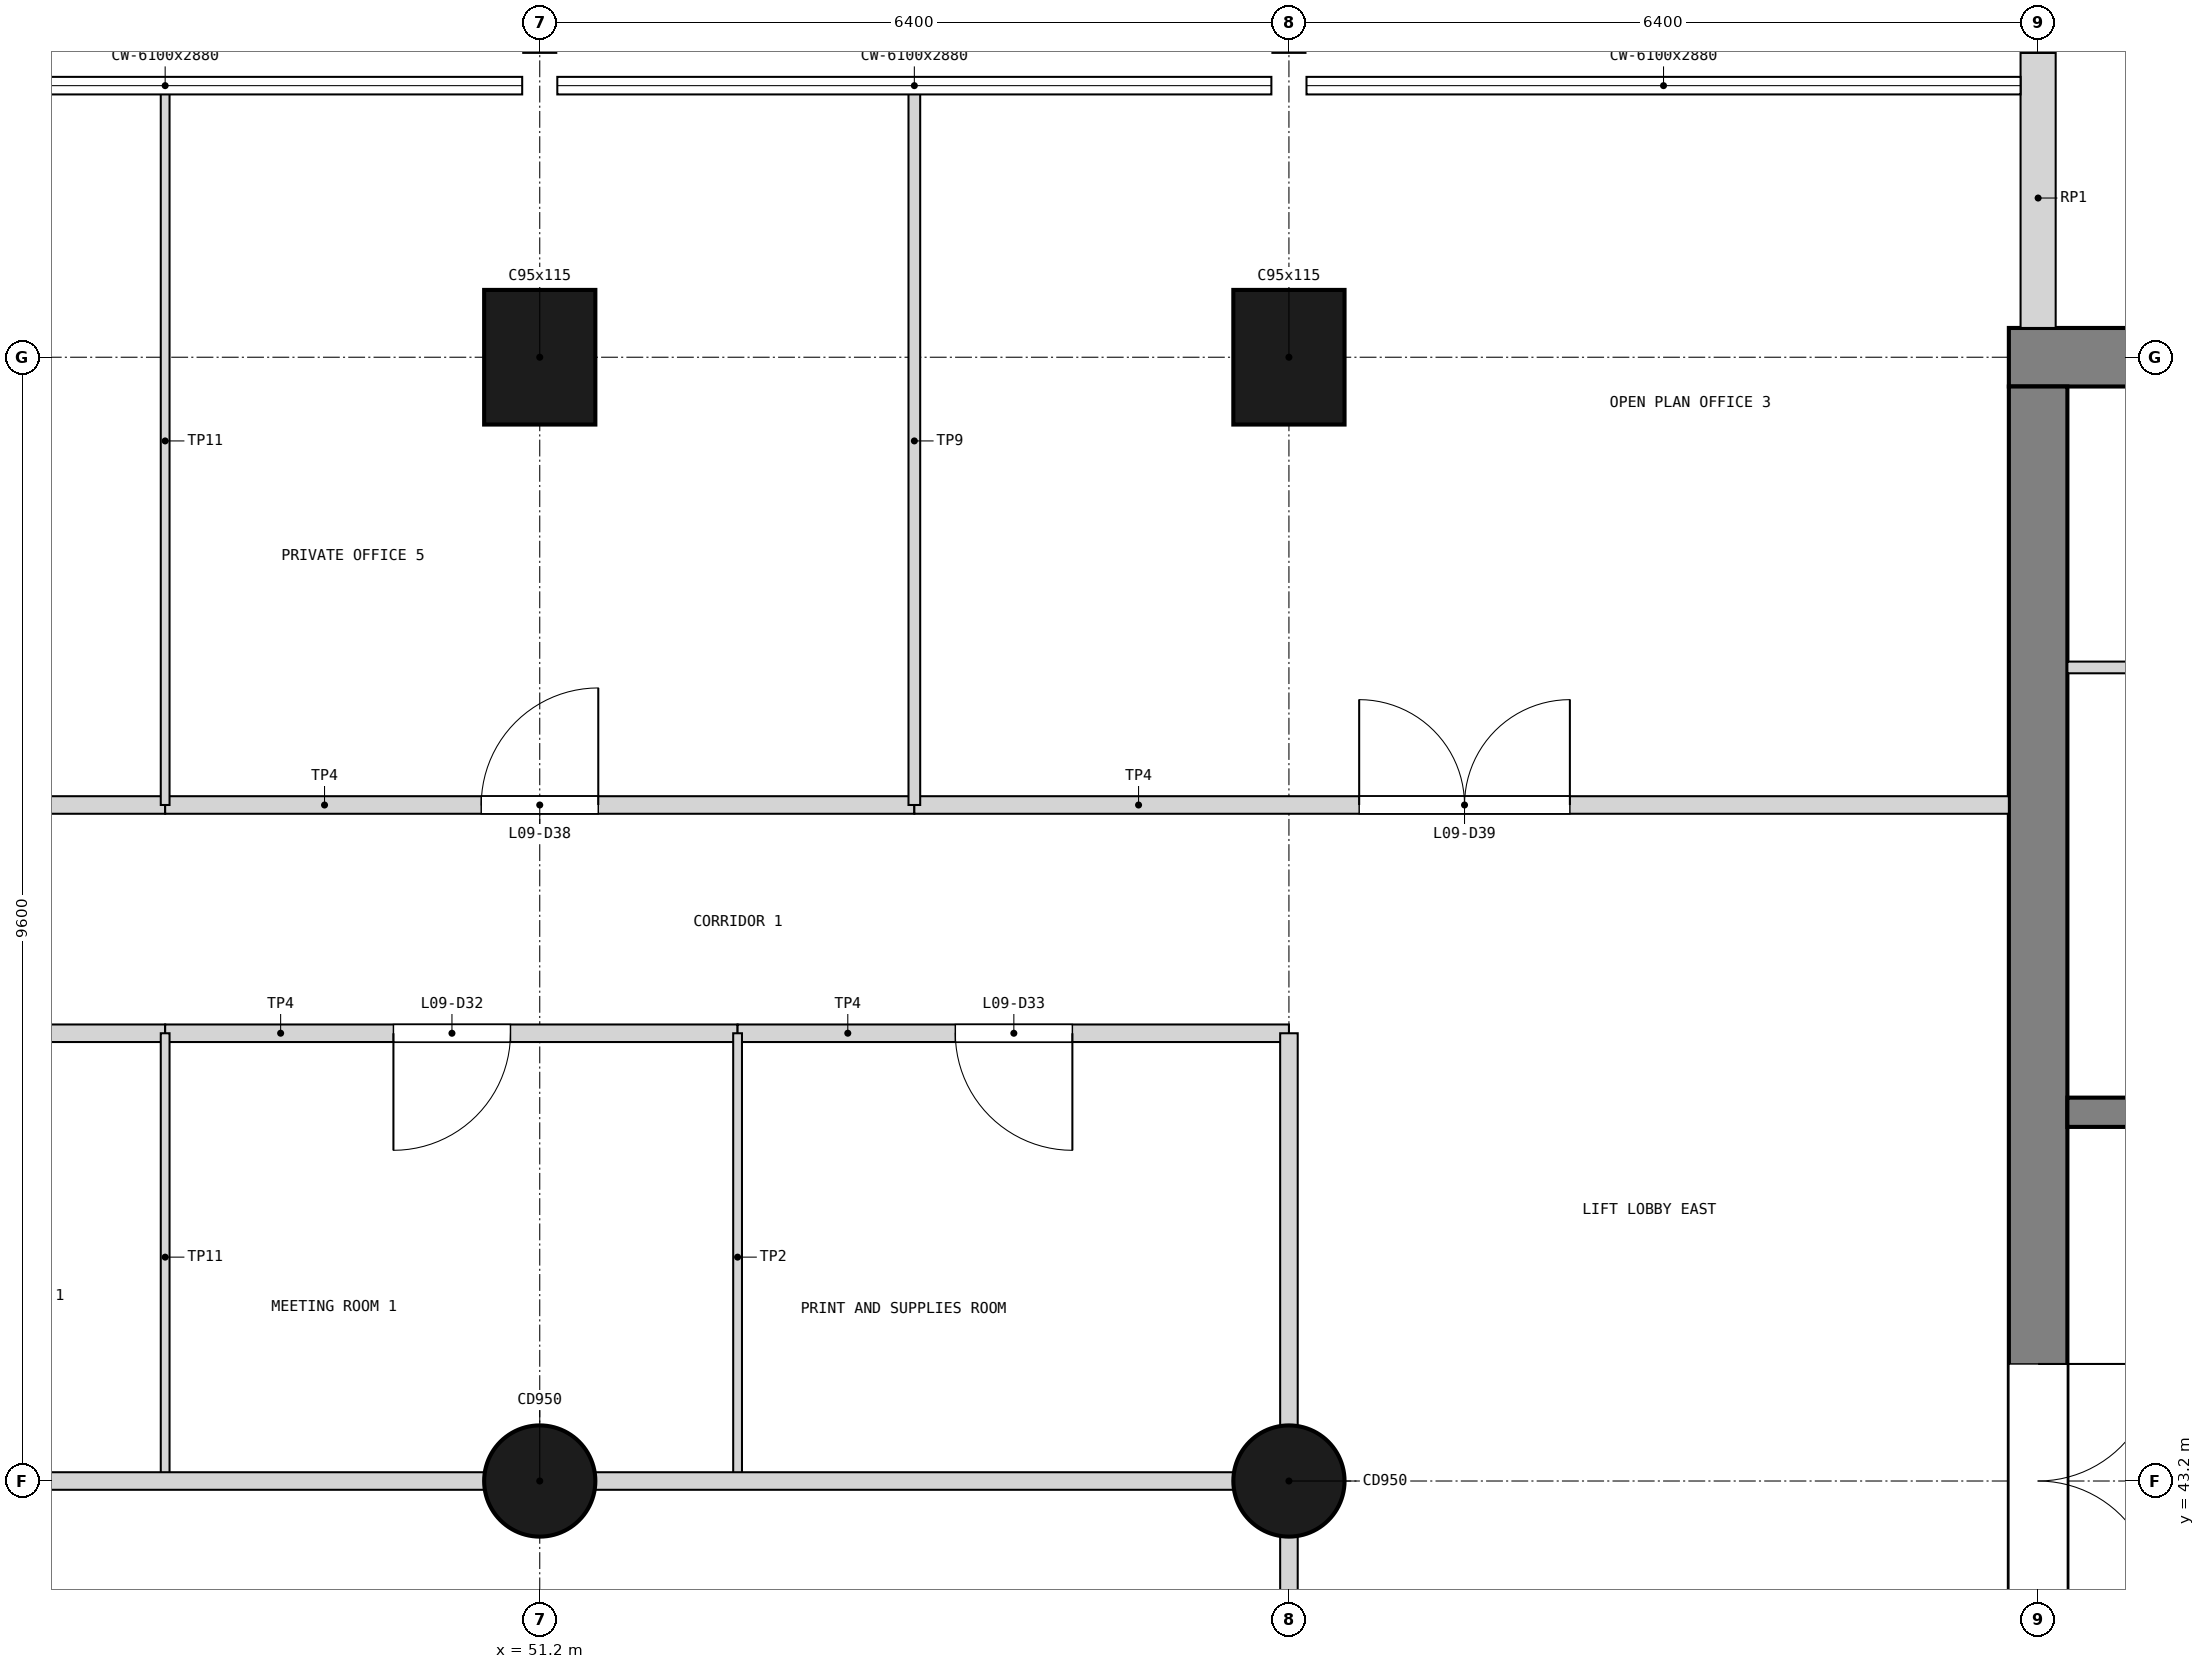
"""IFC4 building model, lengths in metres.
Left out: names, types, materials, properties, quantities, classifications, styles, units other than length and angle.
Written with IfcOpenShell. Run it as: python <this file> out.ifc"""

import sys

from ifc_helpers import new_model, si_unit, direction, frame, frame_2d, origin, origin_2d, place, context, subcontext, project, spatial, rectangle, circle, extrude, element, fill, save


model = new_model("IFC4")
c1 = context("Model", 3, precision=1e-05, world=origin(), true_north=direction((0.0, 1.0)))
c2 = subcontext(c1, "Body", "Model", "MODEL_VIEW")
j1 = project(units=[si_unit("LENGTHUNIT", "METRE"), si_unit("PLANEANGLEUNIT", "RADIAN")], contexts=[c1])
p1 = place(None, origin())
s1 = spatial("IfcSite", under=j1, at=p1, CompositionType="ELEMENT")
p2 = place(p1, origin())
s2 = spatial("IfcBuilding", under=s1, at=p2, CompositionType="ELEMENT")
p3 = place(p2, frame((0.0, 0.0, 36.6)))
s3 = spatial("IfcBuildingStorey", under=s2, at=p3, CompositionType="ELEMENT", Elevation=36.6)
p4 = place(p3, frame((63.75, 52.8, 0.0), z_axis=(0.0, 0.0, 1.0), x_axis=(1.0, 0.0, 0.0)))
e1 = element("IfcWall", 1, at=p4, inside=s3, PredefinedType="SHEAR", context=c2, shape_type="SweptSolid", body=[
    extrude(rectangle(XDim=13.3, YDim=0.5, at=frame_2d((6.65, 0.0))), origin(), (0.0, 0.0, 1.0), 3.9),
])
p5 = place(p4, frame((11.05, 0.0, 1.0)))
e2 = element("IfcOpeningElement", 2, at=p5, cuts=e1, PredefinedType="OPENING", context=c2, shape_type="SweptSolid", body=[
    extrude(rectangle(XDim=0.4, YDim=2.0, at=frame_2d((0.2, 1.0))), frame((0.0, 0.26, 0.0), z_axis=(0.0, -1.0, 0.0), x_axis=(1.0, 0.0, 0.0)), (0.0, 0.0, 1.0), 0.52),
])
p6 = place(p3, frame((64.0, 33.85, 0.0), z_axis=(0.0, 0.0, 1.0), x_axis=(0.0, 1.0, 0.0)))
e3 = element("IfcWall", 3, at=p6, inside=s3, PredefinedType="SHEAR", context=c2, shape_type="SweptSolid", body=[
    extrude(rectangle(XDim=18.7, YDim=0.5, at=frame_2d((9.35, 0.0))), origin(), (0.0, 0.0, 1.0), 3.9),
])
p7 = place(p6, frame((8.35, 0.0, 0.0)))
e4 = element("IfcOpeningElement", 4, at=p7, cuts=e3, PredefinedType="OPENING", context=c2, shape_type="SweptSolid", body=[
    extrude(rectangle(XDim=2.0, YDim=2.1, at=frame_2d((1.0, 1.05))), frame((0.0, 0.26, 0.0), z_axis=(0.0, -1.0, 0.0), x_axis=(1.0, 0.0, 0.0)), (0.0, 0.0, 1.0), 0.52),
])
p8 = place(p3, frame((51.2, 43.2, 0.0), z_axis=(0.0, 0.0, 1.0), x_axis=(1.0, 0.0, 0.0)))
e5 = element("IfcColumn", 5, at=p8, inside=s3, PredefinedType="COLUMN", context=c2, shape_type="SweptSolid", body=[
    extrude(circle(Radius=0.475, at=origin_2d()), origin(), (0.0, 0.0, 1.0), 3.9),
])
p9 = place(p3, frame((51.2, 52.8, 0.0), z_axis=(0.0, 0.0, 1.0), x_axis=(1.0, 0.0, 0.0)))
e6 = element("IfcColumn", 6, at=p9, inside=s3, PredefinedType="COLUMN", context=c2, shape_type="SweptSolid", body=[
    extrude(rectangle(XDim=0.95, YDim=1.15, at=origin_2d()), origin(), (0.0, 0.0, 1.0), 3.9),
])
p10 = place(p3, frame((57.6, 43.2, 0.0), z_axis=(0.0, 0.0, 1.0), x_axis=(1.0, 0.0, 0.0)))
e7 = element("IfcColumn", 7, at=p10, inside=s3, PredefinedType="COLUMN", context=c2, shape_type="SweptSolid", body=[
    extrude(circle(Radius=0.475, at=origin_2d()), origin(), (0.0, 0.0, 1.0), 3.9),
])
p11 = place(p3, frame((57.6, 52.8, 0.0), z_axis=(0.0, 0.0, 1.0), x_axis=(1.0, 0.0, 0.0)))
e8 = element("IfcColumn", 8, at=p11, inside=s3, PredefinedType="COLUMN", context=c2, shape_type="SweptSolid", body=[
    extrude(rectangle(XDim=0.95, YDim=1.15, at=origin_2d()), origin(), (0.0, 0.0, 1.0), 3.9),
])
p12 = place(p3, frame((64.0, 53.05, 0.0), z_axis=(0.0, 0.0, 1.0), x_axis=(0.0, 1.0, 0.0)))
e9 = element("IfcWall", 9, at=p12, inside=s3, PredefinedType="SOLIDWALL", context=c2, shape_type="SweptSolid", body=[
    extrude(rectangle(XDim=2.35, YDim=0.3, at=frame_2d((1.175, 0.0))), origin(), (0.0, 0.0, 1.0), 2.88),
])
p13 = place(p3, frame((69.725, 46.35, 0.0), z_axis=(0.0, 0.0, 1.0), x_axis=(-1.0, 0.0, 0.0)))
e10 = element("IfcWall", 10, at=p13, inside=s3, PredefinedType="SOLIDWALL", context=c2, shape_type="SweptSolid", body=[
    extrude(rectangle(XDim=5.475, YDim=0.25, at=frame_2d((2.738, 0.0))), origin(), (0.0, 0.0, 1.0), 3.6),
])
p14 = place(p3, frame((69.475, 50.15, 0.0), z_axis=(0.0, 0.0, 1.0), x_axis=(-1.0, 0.0, 0.0)))
e11 = element("IfcWall", 11, at=p14, inside=s3, PredefinedType="PARTITIONING", context=c2, shape_type="SweptSolid", body=[
    extrude(rectangle(XDim=5.225, YDim=0.1, at=frame_2d((2.613, 0.0))), origin(), (0.0, 0.0, 1.0), 3.6),
])
p15 = place(p3, frame((41.6, 47.025, 0.0), z_axis=(0.0, 0.0, 1.0), x_axis=(1.0, 0.0, 0.0)))
e12 = element("IfcWall", 12, at=p15, inside=s3, PredefinedType="PARTITIONING", context=c2, shape_type="SweptSolid", body=[
    extrude(rectangle(XDim=6.4, YDim=0.15, at=frame_2d((3.2, 0.0))), origin(), (0.0, 0.0, 1.0), 3.68),
])
p16 = place(p15, frame((2.3, 0.0, 0.0)))
e13 = element("IfcOpeningElement", 13, at=p16, cuts=e12, PredefinedType="OPENING", context=c2, shape_type="SweptSolid", body=[
    extrude(rectangle(XDim=1.8, YDim=2.1, at=frame_2d((0.9, 1.05))), frame((0.0, 0.085, 0.0), z_axis=(0.0, -1.0, 0.0), x_axis=(1.0, 0.0, 0.0)), (0.0, 0.0, 1.0), 0.17),
])
p17 = place(p3, frame((48.0, 47.025, 0.0), z_axis=(0.0, 0.0, 1.0), x_axis=(1.0, 0.0, 0.0)))
e14 = element("IfcWall", 14, at=p17, inside=s3, PredefinedType="PARTITIONING", context=c2, shape_type="SweptSolid", body=[
    extrude(rectangle(XDim=4.89, YDim=0.15, at=frame_2d((2.445, 0.0))), origin(), (0.0, 0.0, 1.0), 3.68),
])
p18 = place(p17, frame((1.95, 0.0, 0.0)))
e15 = element("IfcOpeningElement", 15, at=p18, cuts=e14, PredefinedType="OPENING", context=c2, shape_type="SweptSolid", body=[
    extrude(rectangle(XDim=1.0, YDim=2.1, at=frame_2d((0.5, 1.05))), frame((0.0, 0.085, 0.0), z_axis=(0.0, -1.0, 0.0), x_axis=(1.0, 0.0, 0.0)), (0.0, 0.0, 1.0), 0.17),
])
p19 = place(p3, frame((52.89, 47.025, 0.0), z_axis=(0.0, 0.0, 1.0), x_axis=(1.0, 0.0, 0.0)))
e16 = element("IfcWall", 16, at=p19, inside=s3, PredefinedType="PARTITIONING", context=c2, shape_type="SweptSolid", body=[
    extrude(rectangle(XDim=4.71, YDim=0.15, at=frame_2d((2.355, 0.0))), origin(), (0.0, 0.0, 1.0), 3.68),
])
p20 = place(p19, frame((1.86, 0.0, 0.0)))
e17 = element("IfcOpeningElement", 17, at=p20, cuts=e16, PredefinedType="OPENING", context=c2, shape_type="SweptSolid", body=[
    extrude(rectangle(XDim=1.0, YDim=2.1, at=frame_2d((0.5, 1.05))), frame((0.0, 0.085, 0.0), z_axis=(0.0, -1.0, 0.0), x_axis=(1.0, 0.0, 0.0)), (0.0, 0.0, 1.0), 0.17),
])
p21 = place(p3, frame((48.0, 43.2, 0.0), z_axis=(0.0, 0.0, 1.0), x_axis=(0.0, 1.0, 0.0)))
e18 = element("IfcWall", 18, at=p21, inside=s3, PredefinedType="PARTITIONING", context=c2, shape_type="SweptSolid", body=[
    extrude(rectangle(XDim=3.825, YDim=0.075, at=frame_2d((1.913, 0.0))), origin(), (0.0, 0.0, 1.0), 3.08),
])
p22 = place(p3, frame((52.89, 43.2, 0.0), z_axis=(0.0, 0.0, 1.0), x_axis=(0.0, 1.0, 0.0)))
e19 = element("IfcWall", 19, at=p22, inside=s3, PredefinedType="PARTITIONING", context=c2, shape_type="SweptSolid", body=[
    extrude(rectangle(XDim=3.825, YDim=0.075, at=frame_2d((1.913, 0.0))), origin(), (0.0, 0.0, 1.0), 3.68),
])
p23 = place(p3, frame((41.6, 48.975, 0.0), z_axis=(0.0, 0.0, 1.0), x_axis=(1.0, 0.0, 0.0)))
e20 = element("IfcWall", 20, at=p23, inside=s3, PredefinedType="PARTITIONING", context=c2, shape_type="SweptSolid", body=[
    extrude(rectangle(XDim=6.4, YDim=0.15, at=frame_2d((3.2, 0.0))), origin(), (0.0, 0.0, 1.0), 3.68),
])
p24 = place(p23, frame((2.7, 0.0, 0.0)))
e21 = element("IfcOpeningElement", 21, at=p24, cuts=e20, PredefinedType="OPENING", context=c2, shape_type="SweptSolid", body=[
    extrude(rectangle(XDim=1.0, YDim=2.1, at=frame_2d((0.5, 1.05))), frame((0.0, 0.085, 0.0), z_axis=(0.0, -1.0, 0.0), x_axis=(1.0, 0.0, 0.0)), (0.0, 0.0, 1.0), 0.17),
])
p25 = place(p3, frame((48.0, 48.975, 0.0), z_axis=(0.0, 0.0, 1.0), x_axis=(1.0, 0.0, 0.0)))
e22 = element("IfcWall", 22, at=p25, inside=s3, PredefinedType="PARTITIONING", context=c2, shape_type="SweptSolid", body=[
    extrude(rectangle(XDim=6.4, YDim=0.15, at=frame_2d((3.2, 0.0))), origin(), (0.0, 0.0, 1.0), 3.68),
])
p26 = place(p25, frame((2.7, 0.0, 0.0)))
e23 = element("IfcOpeningElement", 23, at=p26, cuts=e22, PredefinedType="OPENING", context=c2, shape_type="SweptSolid", body=[
    extrude(rectangle(XDim=1.0, YDim=2.1, at=frame_2d((0.5, 1.05))), frame((0.0, 0.085, 0.0), z_axis=(0.0, -1.0, 0.0), x_axis=(1.0, 0.0, 0.0)), (0.0, 0.0, 1.0), 0.17),
])
p27 = place(p3, frame((54.4, 48.975, 0.0), z_axis=(0.0, 0.0, 1.0), x_axis=(1.0, 0.0, 0.0)))
e24 = element("IfcWall", 24, at=p27, inside=s3, PredefinedType="PARTITIONING", context=c2, shape_type="SweptSolid", body=[
    extrude(rectangle(XDim=9.35, YDim=0.15, at=frame_2d((4.675, 0.0))), origin(), (0.0, 0.0, 1.0), 3.68),
])
p28 = place(p27, frame((3.8, 0.0, 0.0)))
e25 = element("IfcOpeningElement", 25, at=p28, cuts=e24, PredefinedType="OPENING", context=c2, shape_type="SweptSolid", body=[
    extrude(rectangle(XDim=1.8, YDim=2.1, at=frame_2d((0.9, 1.05))), frame((0.0, 0.085, 0.0), z_axis=(0.0, -1.0, 0.0), x_axis=(1.0, 0.0, 0.0)), (0.0, 0.0, 1.0), 0.17),
])
p29 = place(p3, frame((48.0, 48.975, 0.0), z_axis=(0.0, 0.0, 1.0), x_axis=(0.0, 1.0, 0.0)))
e26 = element("IfcWall", 26, at=p29, inside=s3, PredefinedType="PARTITIONING", context=c2, shape_type="SweptSolid", body=[
    extrude(rectangle(XDim=6.125, YDim=0.075, at=frame_2d((3.062, 0.0))), origin(), (0.0, 0.0, 1.0), 3.08),
])
p30 = place(p3, frame((54.4, 48.975, 0.0), z_axis=(0.0, 0.0, 1.0), x_axis=(0.0, 1.0, 0.0)))
e27 = element("IfcWall", 27, at=p30, inside=s3, PredefinedType="PARTITIONING", context=c2, shape_type="SweptSolid", body=[
    extrude(rectangle(XDim=6.125, YDim=0.1, at=frame_2d((3.062, 0.0))), origin(), (0.0, 0.0, 1.0), 3.08),
])
p31 = place(p3, frame((57.6, 33.6, 0.0), z_axis=(0.0, 0.0, 1.0), x_axis=(0.0, 1.0, 0.0)))
e28 = element("IfcWall", 28, at=p31, inside=s3, PredefinedType="PARTITIONING", context=c2, shape_type="SweptSolid", body=[
    extrude(rectangle(XDim=13.425, YDim=0.15, at=frame_2d((6.712, 0.0))), origin(), (0.0, 0.0, 1.0), 2.78),
])
p32 = place(p3, frame((32.0, 43.2, 0.0), z_axis=(0.0, 0.0, 1.0), x_axis=(1.0, 0.0, 0.0)))
e29 = element("IfcWall", 29, at=p32, inside=s3, PredefinedType="PARTITIONING", context=c2, shape_type="SweptSolid", body=[
    extrude(rectangle(XDim=25.6, YDim=0.15, at=frame_2d((12.8, 0.0))), origin(), (0.0, 0.0, 1.0), 2.88),
])
p33 = place(p7, frame((2.0, 0.0, 0.0), z_axis=(0.0, 0.0, 1.0), x_axis=(-1.0, 0.0, 0.0)))
e30 = element("IfcDoor", 30, at=p33, inside=s3, OperationType="DOUBLE_DOOR_SINGLE_SWING", PredefinedType="DOOR", context=c2, shape_type="SweptSolid", body=[
    extrude(rectangle(XDim=2.0, YDim=2.1, at=frame_2d((1.0, 1.05))), frame((0.0, 0.025, 0.0), z_axis=(0.0, -1.0, 0.0), x_axis=(1.0, 0.0, 0.0)), (0.0, 0.0, 1.0), 0.05),
])
fill(e4, e30)
p34 = place(p18, frame((1.0, 0.0, 0.0), z_axis=(0.0, 0.0, 1.0), x_axis=(-1.0, 0.0, 0.0)))
e31 = element("IfcDoor", 31, at=p34, inside=s3, OperationType="SINGLE_SWING_RIGHT", PredefinedType="DOOR", context=c2, shape_type="SweptSolid", body=[
    extrude(rectangle(XDim=1.0, YDim=2.1, at=frame_2d((0.5, 1.05))), frame((0.0, 0.025, 0.0), z_axis=(0.0, -1.0, 0.0), x_axis=(1.0, 0.0, 0.0)), (0.0, 0.0, 1.0), 0.05),
])
fill(e15, e31)
p35 = place(p20, frame((1.0, 0.0, 0.0), z_axis=(0.0, 0.0, 1.0), x_axis=(-1.0, 0.0, 0.0)))
e32 = element("IfcDoor", 32, at=p35, inside=s3, OperationType="SINGLE_SWING_LEFT", PredefinedType="DOOR", context=c2, shape_type="SweptSolid", body=[
    extrude(rectangle(XDim=1.0, YDim=2.1, at=frame_2d((0.5, 1.05))), frame((0.0, 0.025, 0.0), z_axis=(0.0, -1.0, 0.0), x_axis=(1.0, 0.0, 0.0)), (0.0, 0.0, 1.0), 0.05),
])
fill(e17, e32)
p36 = place(p26, origin())
e33 = element("IfcDoor", 33, at=p36, inside=s3, OperationType="SINGLE_SWING_RIGHT", PredefinedType="DOOR", context=c2, shape_type="SweptSolid", body=[
    extrude(rectangle(XDim=1.0, YDim=2.1, at=frame_2d((0.5, 1.05))), frame((0.0, 0.025, 0.0), z_axis=(0.0, -1.0, 0.0), x_axis=(1.0, 0.0, 0.0)), (0.0, 0.0, 1.0), 0.05),
])
fill(e23, e33)
p37 = place(p28, origin())
e34 = element("IfcDoor", 34, at=p37, inside=s3, OperationType="DOUBLE_DOOR_SINGLE_SWING", PredefinedType="DOOR", context=c2, shape_type="SweptSolid", body=[
    extrude(rectangle(XDim=1.8, YDim=2.1, at=frame_2d((0.9, 1.05))), frame((0.0, 0.025, 0.0), z_axis=(0.0, -1.0, 0.0), x_axis=(1.0, 0.0, 0.0)), (0.0, 0.0, 1.0), 0.05),
])
fill(e25, e34)
save(model, sys.argv[1])
